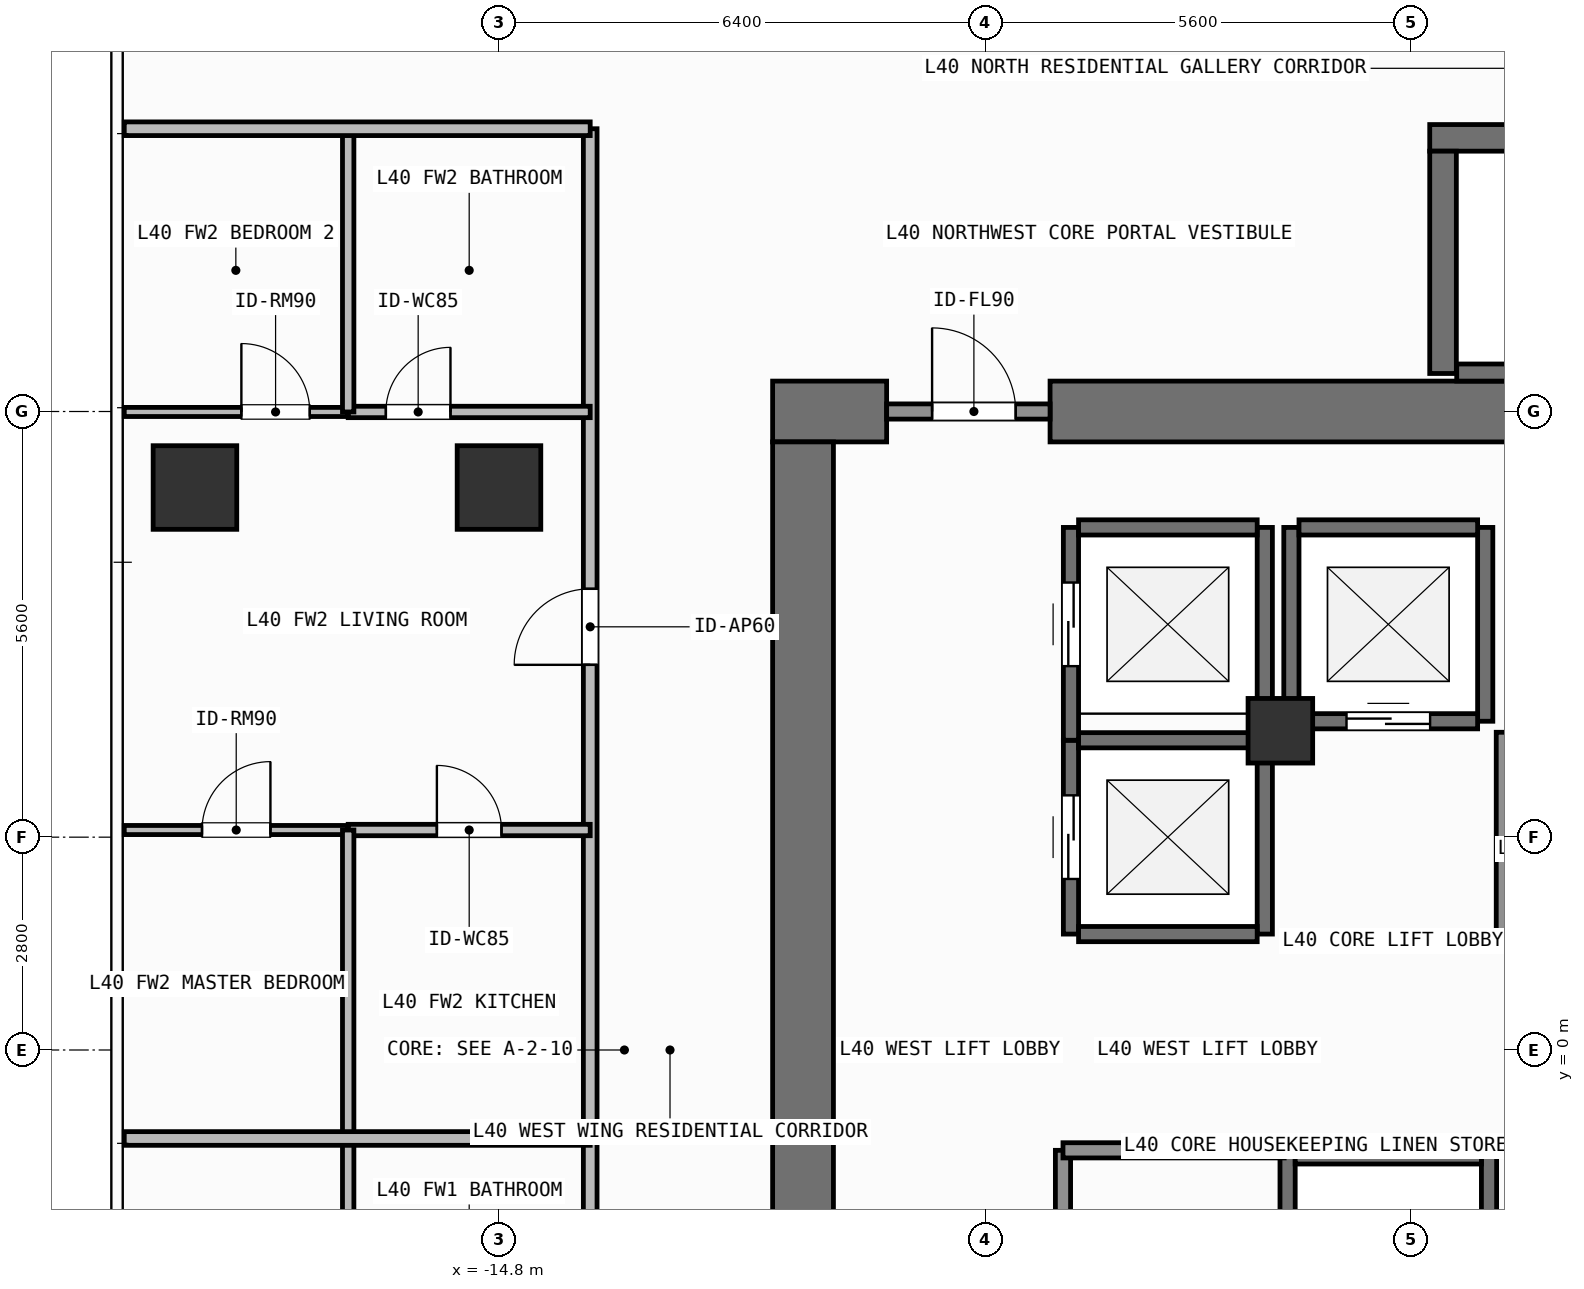
"""IFC4 building model, lengths in metres.
Left out: names, types, materials, properties, quantities, classifications, styles, units other than length and angle.
Written with IfcOpenShell. Run it as: python <this file> out.ifc"""

import sys

from ifc_helpers import new_model, si_unit, direction, frame, frame_2d, origin, origin_2d, place, context, subcontext, project, spatial, rectangle, extrude, element, fill, save


model = new_model("IFC4")
c1 = context("Model", 3, precision=1e-05, world=origin(), true_north=direction((0.0, 1.0)))
c2 = subcontext(c1, "Body", "Model", "MODEL_VIEW")
j1 = project(units=[si_unit("LENGTHUNIT", "METRE"), si_unit("PLANEANGLEUNIT", "RADIAN")], contexts=[c1])
p1 = place(None, origin())
s1 = spatial("IfcSite", under=j1, at=p1, CompositionType="ELEMENT")
p2 = place(p1, origin())
s2 = spatial("IfcBuilding", under=s1, at=p2, CompositionType="ELEMENT")
p3 = place(p2, frame((0.0, 0.0, 164.1)))
s3 = spatial("IfcBuildingStorey", under=s2, at=p3, CompositionType="ELEMENT", Elevation=164.1)
p4 = place(p3, frame((-11.2, 8.4, 0.0), z_axis=(0.0, 0.0, 1.0), x_axis=(1.0, 0.0, 0.0)))
e1 = element("IfcWall", 1, at=p4, inside=s3, PredefinedType="SHEAR", context=c2, shape_type="SweptSolid", body=[
    extrude(rectangle(XDim=1.5, YDim=0.8, at=frame_2d((0.75, 0.0))), origin(), (0.0, 0.0, 1.0), 3.9),
])
p5 = place(p3, frame((-7.55, 8.4, 0.0), z_axis=(0.0, 0.0, 1.0), x_axis=(1.0, 0.0, 0.0)))
e2 = element("IfcWall", 2, at=p5, inside=s3, PredefinedType="SHEAR", context=c2, shape_type="SweptSolid", body=[
    extrude(rectangle(XDim=16.35, YDim=0.8, at=frame_2d((8.175, 0.0))), origin(), (0.0, 0.0, 1.0), 3.9),
])
p6 = place(p3, frame((-10.8, -8.0, 0.0), z_axis=(0.0, 0.0, 1.0), x_axis=(0.0, 1.0, 0.0)))
e3 = element("IfcWall", 3, at=p6, inside=s3, PredefinedType="SHEAR", context=c2, shape_type="SweptSolid", body=[
    extrude(rectangle(XDim=16.0, YDim=0.8, at=frame_2d((8.0, 0.0))), origin(), (0.0, 0.0, 1.0), 3.9),
])
p7 = place(p3, frame((-2.555, 12.0, 0.0), z_axis=(0.0, 0.0, 1.0), x_axis=(1.0, 0.0, 0.0)))
e4 = element("IfcWall", 4, at=p7, inside=s3, PredefinedType="SHEAR", context=c2, shape_type="SweptSolid", body=[
    extrude(rectangle(XDim=7.31, YDim=0.35, at=frame_2d((3.655, 0.0))), origin(), (0.0, 0.0, 1.0), 3.9),
])
p8 = place(p3, frame((-2.2, 8.913, 0.0), z_axis=(0.0, 0.0, 1.0), x_axis=(1.0, 0.0, 0.0)))
e5 = element("IfcWall", 5, at=p8, inside=s3, PredefinedType="SHEAR", context=c2, shape_type="SweptSolid", body=[
    extrude(rectangle(XDim=6.6, YDim=0.225, at=frame_2d((3.3, 0.0))), origin(), (0.0, 0.0, 1.0), 3.9),
])
p9 = place(p3, frame((-2.38, 8.9, 0.0), z_axis=(0.0, 0.0, 1.0), x_axis=(0.0, 1.0, 0.0)))
e6 = element("IfcWall", 6, at=p9, inside=s3, PredefinedType="SHEAR", context=c2, shape_type="SweptSolid", body=[
    extrude(rectangle(XDim=2.925, YDim=0.35, at=frame_2d((1.462, 0.0))), origin(), (0.0, 0.0, 1.0), 3.9),
])
p10 = place(p3, frame((-14.8, 7.4, 0.0), z_axis=(0.0, 0.0, 1.0), x_axis=(1.0, 0.0, 0.0)))
e7 = element("IfcColumn", 7, at=p10, inside=s3, PredefinedType="COLUMN", context=c2, shape_type="SweptSolid", body=[
    extrude(rectangle(XDim=1.1, YDim=1.1, at=origin_2d()), origin(), (0.0, 0.0, 1.0), 3.9),
])
p11 = place(p3, frame((-4.52, 4.2, 0.0), z_axis=(0.0, 0.0, 1.0), x_axis=(1.0, 0.0, 0.0)))
e8 = element("IfcColumn", 8, at=p11, inside=s3, PredefinedType="COLUMN", context=c2, shape_type="SweptSolid", body=[
    extrude(rectangle(XDim=0.85, YDim=0.85, at=origin_2d()), origin(), (0.0, 0.0, 1.0), 3.9),
])
p12 = place(p3, frame((-18.8, 7.4, 0.0), z_axis=(0.0, 0.0, 1.0), x_axis=(1.0, 0.0, 0.0)))
e9 = element("IfcColumn", 9, at=p12, inside=s3, PredefinedType="COLUMN", context=c2, shape_type="SweptSolid", body=[
    extrude(rectangle(XDim=1.1, YDim=1.1, at=origin_2d()), origin(), (0.0, 0.0, 1.0), 3.9),
])
p13 = place(p3, frame((-7.275, 1.525, 0.0), z_axis=(0.0, 0.0, 1.0), x_axis=(0.0, 1.0, 0.0)))
e10 = element("IfcWall", 10, at=p13, inside=s3, PredefinedType="SHEAR", context=c2, shape_type="SweptSolid", body=[
    extrude(rectangle(XDim=2.55, YDim=0.2, at=frame_2d((1.275, 0.0))), origin(), (0.0, 0.0, 1.0), 3.62),
])
p14 = place(p13, frame((0.725, 0.0, 0.0)))
e11 = element("IfcOpeningElement", 11, at=p14, cuts=e10, PredefinedType="OPENING", context=c2, shape_type="SweptSolid", body=[
    extrude(rectangle(XDim=1.1, YDim=2.2, at=frame_2d((0.55, 1.1))), frame((0.0, 0.11, 0.0), z_axis=(0.0, -1.0, 0.0), x_axis=(1.0, 0.0, 0.0)), (0.0, 0.0, 1.0), 0.22),
])
p15 = place(p3, frame((-4.725, 1.525, 0.0), z_axis=(0.0, 0.0, 1.0), x_axis=(0.0, 1.0, 0.0)))
e12 = element("IfcWall", 12, at=p15, inside=s3, PredefinedType="SHEAR", context=c2, shape_type="SweptSolid", body=[
    extrude(rectangle(XDim=2.55, YDim=0.2, at=frame_2d((1.275, 0.0))), origin(), (0.0, 0.0, 1.0), 3.62),
])
for number, where, z_axis, x_axis in (
    (13, (-7.175, 1.525, 0.0), (0.0, 0.0, 1.0), (1.0, 0.0, 0.0)),
    (14, (-7.175, 4.075, 0.0), (0.0, 0.0, 1.0), (1.0, 0.0, 0.0)),
):
    element("IfcWall", number, at=place(p3, frame(where, z_axis=z_axis, x_axis=x_axis)), inside=s3, PredefinedType="SHEAR", context=c2, shape_type="SweptSolid", body=[
        extrude(rectangle(XDim=2.35, YDim=0.2, at=frame_2d((1.175, 0.0))), origin(), (0.0, 0.0, 1.0), 3.62),
    ])
p16 = place(p3, frame((-7.275, 4.075, 0.0), z_axis=(0.0, 0.0, 1.0), x_axis=(0.0, 1.0, 0.0)))
e15 = element("IfcWall", 15, at=p16, inside=s3, PredefinedType="SHEAR", context=c2, shape_type="SweptSolid", body=[
    extrude(rectangle(XDim=2.8, YDim=0.2, at=frame_2d((1.4, 0.0))), origin(), (0.0, 0.0, 1.0), 3.62),
])
p17 = place(p16, frame((0.975, 0.0, 0.0)))
e16 = element("IfcOpeningElement", 16, at=p17, cuts=e15, PredefinedType="OPENING", context=c2, shape_type="SweptSolid", body=[
    extrude(rectangle(XDim=1.1, YDim=2.2, at=frame_2d((0.55, 1.1))), frame((0.0, 0.11, 0.0), z_axis=(0.0, -1.0, 0.0), x_axis=(1.0, 0.0, 0.0)), (0.0, 0.0, 1.0), 0.22),
])
p18 = place(p3, frame((-4.725, 4.075, 0.0), z_axis=(0.0, 0.0, 1.0), x_axis=(0.0, 1.0, 0.0)))
e17 = element("IfcWall", 17, at=p18, inside=s3, PredefinedType="SHEAR", context=c2, shape_type="SweptSolid", body=[
    extrude(rectangle(XDim=2.8, YDim=0.2, at=frame_2d((1.4, 0.0))), origin(), (0.0, 0.0, 1.0), 3.62),
])
p19 = place(p3, frame((-7.175, 6.875, 0.0), z_axis=(0.0, 0.0, 1.0), x_axis=(1.0, 0.0, 0.0)))
e18 = element("IfcWall", 18, at=p19, inside=s3, PredefinedType="SHEAR", context=c2, shape_type="SweptSolid", body=[
    extrude(rectangle(XDim=2.35, YDim=0.2, at=frame_2d((1.175, 0.0))), origin(), (0.0, 0.0, 1.0), 3.62),
])
for number, where, z_axis, x_axis in (
    (19, (-4.375, 4.325, 0.0), (0.0, 0.0, 1.0), (0.0, 1.0, 0.0)),
    (20, (-1.825, 4.325, 0.0), (0.0, 0.0, 1.0), (0.0, 1.0, 0.0)),
):
    element("IfcWall", number, at=place(p3, frame(where, z_axis=z_axis, x_axis=x_axis)), inside=s3, PredefinedType="SHEAR", context=c2, shape_type="SweptSolid", body=[
        extrude(rectangle(XDim=2.55, YDim=0.2, at=frame_2d((1.275, 0.0))), origin(), (0.0, 0.0, 1.0), 3.62),
    ])
p20 = place(p3, frame((-4.275, 4.325, 0.0), z_axis=(0.0, 0.0, 1.0), x_axis=(1.0, 0.0, 0.0)))
e21 = element("IfcWall", 21, at=p20, inside=s3, PredefinedType="SHEAR", context=c2, shape_type="SweptSolid", body=[
    extrude(rectangle(XDim=2.35, YDim=0.2, at=frame_2d((1.175, 0.0))), origin(), (0.0, 0.0, 1.0), 3.62),
])
p21 = place(p20, frame((0.625, 0.0, 0.0)))
e22 = element("IfcOpeningElement", 22, at=p21, cuts=e21, PredefinedType="OPENING", context=c2, shape_type="SweptSolid", body=[
    extrude(rectangle(XDim=1.1, YDim=2.2, at=frame_2d((0.55, 1.1))), frame((0.0, 0.11, 0.0), z_axis=(0.0, -1.0, 0.0), x_axis=(1.0, 0.0, 0.0)), (0.0, 0.0, 1.0), 0.22),
])
p22 = place(p3, frame((-4.275, 6.875, 0.0), z_axis=(0.0, 0.0, 1.0), x_axis=(1.0, 0.0, 0.0)))
e23 = element("IfcWall", 23, at=p22, inside=s3, PredefinedType="SHEAR", context=c2, shape_type="SweptSolid", body=[
    extrude(rectangle(XDim=2.35, YDim=0.2, at=frame_2d((1.175, 0.0))), origin(), (0.0, 0.0, 1.0), 3.62),
])
for number, where, z_axis, x_axis in (
    (24, (-4.425, -4.2, 0.0), (0.0, 0.0, 1.0), (0.0, 1.0, 0.0)),
    (25, (-1.775, -4.2, 0.0), (0.0, 0.0, 1.0), (0.0, 1.0, 0.0)),
):
    element("IfcWall", number, at=place(p3, frame(where, z_axis=z_axis, x_axis=x_axis)), inside=s3, PredefinedType="SHEAR", context=c2, shape_type="SweptSolid", body=[
        extrude(rectangle(XDim=2.8, YDim=0.2, at=frame_2d((1.4, 0.0))), origin(), (0.0, 0.0, 1.0), 3.62),
    ])
p23 = place(p3, frame((-4.325, -1.4, 0.0), z_axis=(0.0, 0.0, 1.0), x_axis=(1.0, 0.0, 0.0)))
e26 = element("IfcWall", 26, at=p23, inside=s3, PredefinedType="SHEAR", context=c2, shape_type="SweptSolid", body=[
    extrude(rectangle(XDim=2.45, YDim=0.2, at=frame_2d((1.225, 0.0))), origin(), (0.0, 0.0, 1.0), 3.62),
])
p24 = place(p3, frame((-9.7, 8.4, 0.0), z_axis=(0.0, 0.0, 1.0), x_axis=(1.0, 0.0, 0.0)))
e27 = element("IfcWall", 27, at=p24, inside=s3, PredefinedType="SOLIDWALL", context=c2, shape_type="SweptSolid", body=[
    extrude(rectangle(XDim=2.15, YDim=0.2, at=frame_2d((1.075, 0.0))), origin(), (0.0, 0.0, 1.0), 2.76),
])
p25 = place(p24, frame((0.598, 0.0, 0.0)))
e28 = element("IfcOpeningElement", 28, at=p25, cuts=e27, PredefinedType="OPENING", context=c2, shape_type="SweptSolid", body=[
    extrude(rectangle(XDim=1.1, YDim=2.15, at=frame_2d((0.55, 1.075))), frame((0.0, 0.11, 0.0), z_axis=(0.0, -1.0, 0.0), x_axis=(1.0, 0.0, 0.0)), (0.0, 0.0, 1.0), 0.22),
])
p26 = place(p3, frame((-7.38, -7.04, 0.0), z_axis=(0.0, 0.0, 1.0), x_axis=(0.0, 1.0, 0.0)))
e29 = element("IfcWall", 29, at=p26, inside=s3, PredefinedType="SOLIDWALL", context=c2, shape_type="SweptSolid", body=[
    extrude(rectangle(XDim=5.72, YDim=0.2, at=frame_2d((2.86, 0.0))), origin(), (0.0, 0.0, 1.0), 3.62),
])
p27 = place(p26, frame((2.31, 0.0, 0.0)))
e30 = element("IfcOpeningElement", 30, at=p27, cuts=e29, PredefinedType="OPENING", context=c2, shape_type="SweptSolid", body=[
    extrude(rectangle(XDim=0.92, YDim=2.1, at=frame_2d((0.46, 1.05))), frame((0.0, 0.11, 0.0), z_axis=(0.0, -1.0, 0.0), x_axis=(1.0, 0.0, 0.0)), (0.0, 0.0, 1.0), 0.22),
])
p28 = place(p3, frame((-13.6, -12.12, 0.0), z_axis=(0.0, 0.0, 1.0), x_axis=(0.0, 1.0, 0.0)))
e31 = element("IfcWall", 31, at=p28, inside=s3, PredefinedType="PARTITIONING", context=c2, shape_type="SweptSolid", body=[
    extrude(rectangle(XDim=10.956, YDim=0.18, at=frame_2d((5.478, 0.0))), origin(), (0.0, 0.0, 1.0), 3.62),
])
p29 = place(p28, frame((5.335, 0.0, 0.0)))
e32 = element("IfcOpeningElement", 32, at=p29, cuts=e31, PredefinedType="OPENING", context=c2, shape_type="SweptSolid", body=[
    extrude(rectangle(XDim=1.0, YDim=2.2, at=frame_2d((0.5, 1.1))), frame((0.0, 0.1, 0.0), z_axis=(0.0, -1.0, 0.0), x_axis=(1.0, 0.0, 0.0)), (0.0, 0.0, 1.0), 0.2),
])
p30 = place(p3, frame((-13.6, -1.164, 0.0), z_axis=(0.0, 0.0, 1.0), x_axis=(0.0, 1.0, 0.0)))
e33 = element("IfcWall", 33, at=p30, inside=s3, PredefinedType="PARTITIONING", context=c2, shape_type="SweptSolid", body=[
    extrude(rectangle(XDim=13.284, YDim=0.18, at=frame_2d((6.642, 0.0))), origin(), (0.0, 0.0, 1.0), 3.62),
])
p31 = place(p30, frame((6.231, 0.0, 0.0)))
e34 = element("IfcOpeningElement", 34, at=p31, cuts=e33, PredefinedType="OPENING", context=c2, shape_type="SweptSolid", body=[
    extrude(rectangle(XDim=1.0, YDim=2.2, at=frame_2d((0.5, 1.1))), frame((0.0, 0.1, 0.0), z_axis=(0.0, -1.0, 0.0), x_axis=(1.0, 0.0, 0.0)), (0.0, 0.0, 1.0), 0.2),
])
p32 = place(p3, frame((-16.784, 8.394, 0.0), z_axis=(0.0, 0.0, 1.0), x_axis=(1.0, 0.0, 0.0)))
e35 = element("IfcWall", 35, at=p32, inside=s3, PredefinedType="PARTITIONING", context=c2, shape_type="SweptSolid", body=[
    extrude(rectangle(XDim=3.184, YDim=0.15, at=frame_2d((1.592, 0.0))), origin(), (0.0, 0.0, 1.0), 3.62),
])
p33 = place(p32, frame((0.496, 0.0, 0.0)))
e36 = element("IfcOpeningElement", 36, at=p33, cuts=e35, PredefinedType="OPENING", context=c2, shape_type="SweptSolid", body=[
    extrude(rectangle(XDim=0.85, YDim=2.1, at=frame_2d((0.425, 1.05))), frame((0.0, 0.085, 0.0), z_axis=(0.0, -1.0, 0.0), x_axis=(1.0, 0.0, 0.0)), (0.0, 0.0, 1.0), 0.17),
])
p34 = place(p3, frame((-16.784, 2.894, 0.0), z_axis=(0.0, 0.0, 1.0), x_axis=(1.0, 0.0, 0.0)))
e37 = element("IfcWall", 37, at=p34, inside=s3, PredefinedType="PARTITIONING", context=c2, shape_type="SweptSolid", body=[
    extrude(rectangle(XDim=3.184, YDim=0.15, at=frame_2d((1.592, 0.0))), origin(), (0.0, 0.0, 1.0), 3.62),
])
p35 = place(p34, frame((1.167, 0.0, 0.0)))
e38 = element("IfcOpeningElement", 38, at=p35, cuts=e37, PredefinedType="OPENING", context=c2, shape_type="SweptSolid", body=[
    extrude(rectangle(XDim=0.85, YDim=2.1, at=frame_2d((0.425, 1.05))), frame((0.0, 0.085, 0.0), z_axis=(0.0, -1.0, 0.0), x_axis=(1.0, 0.0, 0.0)), (0.0, 0.0, 1.0), 0.17),
])
p36 = place(p3, frame((-19.73, 2.894, 0.0), z_axis=(0.0, 0.0, 1.0), x_axis=(1.0, 0.0, 0.0)))
e39 = element("IfcWall", 39, at=p36, inside=s3, PredefinedType="PARTITIONING", context=c2, shape_type="SweptSolid", body=[
    extrude(rectangle(XDim=2.946, YDim=0.12, at=frame_2d((1.473, 0.0))), origin(), (0.0, 0.0, 1.0), 3.62),
])
p37 = place(p36, frame((1.023, 0.0, 0.0)))
e40 = element("IfcOpeningElement", 40, at=p37, cuts=e39, PredefinedType="OPENING", context=c2, shape_type="SweptSolid", body=[
    extrude(rectangle(XDim=0.9, YDim=2.1, at=frame_2d((0.45, 1.05))), frame((0.0, 0.07, 0.0), z_axis=(0.0, -1.0, 0.0), x_axis=(1.0, 0.0, 0.0)), (0.0, 0.0, 1.0), 0.14),
])
p38 = place(p3, frame((-19.73, 8.394, 0.0), z_axis=(0.0, 0.0, 1.0), x_axis=(1.0, 0.0, 0.0)))
e41 = element("IfcWall", 41, at=p38, inside=s3, PredefinedType="PARTITIONING", context=c2, shape_type="SweptSolid", body=[
    extrude(rectangle(XDim=2.946, YDim=0.12, at=frame_2d((1.473, 0.0))), origin(), (0.0, 0.0, 1.0), 3.62),
])
p39 = place(p38, frame((1.541, 0.0, 0.0)))
e42 = element("IfcOpeningElement", 42, at=p39, cuts=e41, PredefinedType="OPENING", context=c2, shape_type="SweptSolid", body=[
    extrude(rectangle(XDim=0.9, YDim=2.1, at=frame_2d((0.45, 1.05))), frame((0.0, 0.07, 0.0), z_axis=(0.0, -1.0, 0.0), x_axis=(1.0, 0.0, 0.0)), (0.0, 0.0, 1.0), 0.14),
])
p40 = place(p3, frame((-7.38, -1.32, 0.0), z_axis=(0.0, 0.0, 1.0), x_axis=(1.0, 0.0, 0.0)))
e43 = element("IfcWall", 43, at=p40, inside=s3, PredefinedType="SOLIDWALL", context=c2, shape_type="SweptSolid", body=[
    extrude(rectangle(XDim=2.91, YDim=0.2, at=frame_2d((1.455, 0.0))), origin(), (0.0, 0.0, 1.0), 3.62),
])
p41 = place(p3, frame((-1.58, 1.48, 0.0), z_axis=(0.0, 0.0, 1.0), x_axis=(0.0, 1.0, 0.0)))
e44 = element("IfcWall", 44, at=p41, inside=s3, PredefinedType="SOLIDWALL", context=c2, shape_type="SweptSolid", body=[
    extrude(rectangle(XDim=2.7, YDim=0.2, at=frame_2d((1.35, 0.0))), origin(), (0.0, 0.0, 1.0), 3.62),
])
p42 = place(p3, frame((-16.784, -4.939, 0.0), z_axis=(0.0, 0.0, 1.0), x_axis=(0.0, 1.0, 0.0)))
e45 = element("IfcWall", 45, at=p42, inside=s3, PredefinedType="PARTITIONING", context=c2, shape_type="SweptSolid", body=[
    extrude(rectangle(XDim=3.775, YDim=0.15, at=frame_2d((1.887, 0.0))), origin(), (0.0, 0.0, 1.0), 3.62),
])
p43 = place(p3, frame((-16.784, -1.164, 0.0), z_axis=(0.0, 0.0, 1.0), x_axis=(0.0, 1.0, 0.0)))
e46 = element("IfcWall", 46, at=p43, inside=s3, PredefinedType="PARTITIONING", context=c2, shape_type="SweptSolid", body=[
    extrude(rectangle(XDim=4.058, YDim=0.15, at=frame_2d((2.029, 0.0))), origin(), (0.0, 0.0, 1.0), 3.62),
])
p44 = place(p3, frame((-16.784, 8.394, 0.0), z_axis=(0.0, 0.0, 1.0), x_axis=(0.0, 1.0, 0.0)))
e47 = element("IfcWall", 47, at=p44, inside=s3, PredefinedType="PARTITIONING", context=c2, shape_type="SweptSolid", body=[
    extrude(rectangle(XDim=3.726, YDim=0.15, at=frame_2d((1.863, 0.0))), origin(), (0.0, 0.0, 1.0), 3.62),
])
for number, where, z_axis, x_axis in (
    (48, (-19.73, -1.164, 0.0), (0.0, 0.0, 1.0), (1.0, 0.0, 0.0)),
    (49, (-19.73, 12.12, 0.0), (0.0, 0.0, 1.0), (1.0, 0.0, 0.0)),
):
    element("IfcWall", number, at=place(p3, frame(where, z_axis=z_axis, x_axis=x_axis)), inside=s3, PredefinedType="PARTITIONING", context=c2, shape_type="SweptSolid", body=[
        extrude(rectangle(XDim=6.13, YDim=0.18, at=frame_2d((3.065, 0.0))), origin(), (0.0, 0.0, 1.0), 3.62),
    ])
p45 = place(p14, origin())
e50 = element("IfcDoor", 50, at=p45, inside=s3, OperationType="SLIDING_TO_LEFT", PredefinedType="DOOR", context=c2, shape_type="SweptSolid", body=[
    extrude(rectangle(XDim=1.1, YDim=2.2, at=frame_2d((0.55, 1.1))), frame((0.0, 0.025, 0.0), z_axis=(0.0, -1.0, 0.0), x_axis=(1.0, 0.0, 0.0)), (0.0, 0.0, 1.0), 0.05),
])
fill(e11, e50)
p46 = place(p17, origin())
e51 = element("IfcDoor", 51, at=p46, inside=s3, OperationType="SLIDING_TO_LEFT", PredefinedType="DOOR", context=c2, shape_type="SweptSolid", body=[
    extrude(rectangle(XDim=1.1, YDim=2.2, at=frame_2d((0.55, 1.1))), frame((0.0, 0.025, 0.0), z_axis=(0.0, -1.0, 0.0), x_axis=(1.0, 0.0, 0.0)), (0.0, 0.0, 1.0), 0.05),
])
fill(e16, e51)
p47 = place(p21, origin())
e52 = element("IfcDoor", 52, at=p47, inside=s3, OperationType="SLIDING_TO_LEFT", PredefinedType="DOOR", context=c2, shape_type="SweptSolid", body=[
    extrude(rectangle(XDim=1.1, YDim=2.2, at=frame_2d((0.55, 1.1))), frame((0.0, 0.025, 0.0), z_axis=(0.0, -1.0, 0.0), x_axis=(1.0, 0.0, 0.0)), (0.0, 0.0, 1.0), 0.05),
])
fill(e22, e52)
p48 = place(p25, origin())
e53 = element("IfcDoor", 53, at=p48, inside=s3, OperationType="SINGLE_SWING_LEFT", PredefinedType="DOOR", context=c2, shape_type="SweptSolid", body=[
    extrude(rectangle(XDim=1.1, YDim=2.15, at=frame_2d((0.55, 1.075))), frame((0.0, 0.025, 0.0), z_axis=(0.0, -1.0, 0.0), x_axis=(1.0, 0.0, 0.0)), (0.0, 0.0, 1.0), 0.05),
])
fill(e28, e53)
p49 = place(p31, origin())
e54 = element("IfcDoor", 54, at=p49, inside=s3, OperationType="SINGLE_SWING_LEFT", PredefinedType="DOOR", context=c2, shape_type="SweptSolid", body=[
    extrude(rectangle(XDim=1.0, YDim=2.2, at=frame_2d((0.5, 1.1))), frame((0.0, 0.025, 0.0), z_axis=(0.0, -1.0, 0.0), x_axis=(1.0, 0.0, 0.0)), (0.0, 0.0, 1.0), 0.05),
])
fill(e34, e54)
p50 = place(p33, origin())
e55 = element("IfcDoor", 55, at=p50, inside=s3, OperationType="SINGLE_SWING_RIGHT", PredefinedType="DOOR", context=c2, shape_type="SweptSolid", body=[
    extrude(rectangle(XDim=0.85, YDim=2.1, at=frame_2d((0.425, 1.05))), frame((0.0, 0.025, 0.0), z_axis=(0.0, -1.0, 0.0), x_axis=(1.0, 0.0, 0.0)), (0.0, 0.0, 1.0), 0.05),
])
fill(e36, e55)
p51 = place(p35, origin())
e56 = element("IfcDoor", 56, at=p51, inside=s3, OperationType="SINGLE_SWING_LEFT", PredefinedType="DOOR", context=c2, shape_type="SweptSolid", body=[
    extrude(rectangle(XDim=0.85, YDim=2.1, at=frame_2d((0.425, 1.05))), frame((0.0, 0.025, 0.0), z_axis=(0.0, -1.0, 0.0), x_axis=(1.0, 0.0, 0.0)), (0.0, 0.0, 1.0), 0.05),
])
fill(e38, e56)
p52 = place(p37, origin())
e57 = element("IfcDoor", 57, at=p52, inside=s3, OperationType="SINGLE_SWING_RIGHT", PredefinedType="DOOR", context=c2, shape_type="SweptSolid", body=[
    extrude(rectangle(XDim=0.9, YDim=2.1, at=frame_2d((0.45, 1.05))), frame((0.0, 0.025, 0.0), z_axis=(0.0, -1.0, 0.0), x_axis=(1.0, 0.0, 0.0)), (0.0, 0.0, 1.0), 0.05),
])
fill(e40, e57)
p53 = place(p39, origin())
e58 = element("IfcDoor", 58, at=p53, inside=s3, OperationType="SINGLE_SWING_LEFT", PredefinedType="DOOR", context=c2, shape_type="SweptSolid", body=[
    extrude(rectangle(XDim=0.9, YDim=2.1, at=frame_2d((0.45, 1.05))), frame((0.0, 0.025, 0.0), z_axis=(0.0, -1.0, 0.0), x_axis=(1.0, 0.0, 0.0)), (0.0, 0.0, 1.0), 0.05),
])
fill(e42, e58)
save(model, sys.argv[1])
